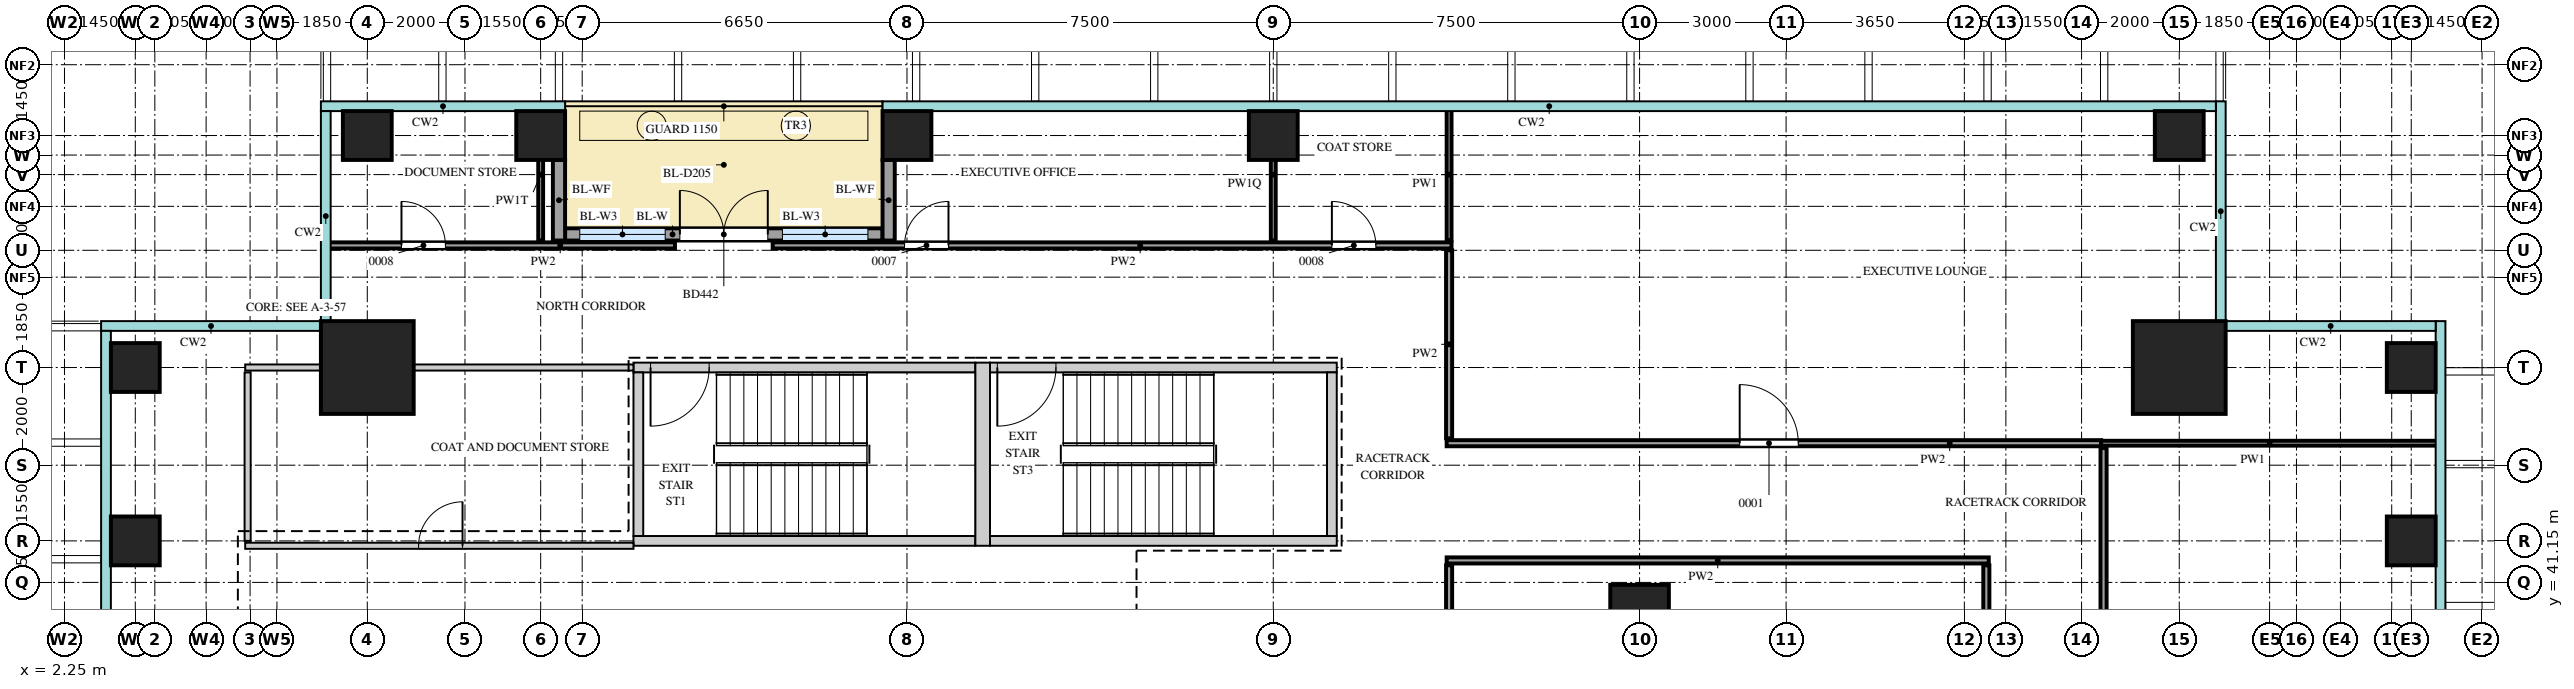
"""IFC4 building model, lengths in metres.
Left out: names, types, materials, properties, quantities, classifications, styles, units other than length and angle.
Written with IfcOpenShell. Run it as: python <this file> out.ifc"""

import sys

from ifc_helpers import new_model, si_unit, direction, frame, frame_2d, origin, origin_2d, place, context, subcontext, project, spatial, rectangle, extrude, source, transform, mapped, element, fill, save


model = new_model("IFC4")
c1 = context("Model", 3, precision=1e-05, world=origin(), true_north=direction((0.0, 1.0)))
c2 = subcontext(c1, "Body", "Model", "MODEL_VIEW")
j1 = project(units=[si_unit("LENGTHUNIT", "METRE"), si_unit("PLANEANGLEUNIT", "RADIAN")], contexts=[c1])
p1 = place(None, origin())
s1 = spatial("IfcSite", under=j1, at=p1, CompositionType="ELEMENT")
p2 = place(p1, origin())
s2 = spatial("IfcBuilding", under=s1, at=p2, CompositionType="ELEMENT")
p3 = place(p2, frame((0.0, 0.0, 200.7)))
s3 = spatial("IfcBuildingStorey", under=s2, at=p3, CompositionType="ELEMENT", Elevation=200.7)
m1 = source(origin(), c2, "Body", "SweptSolid", [
    extrude(rectangle(XDim=7.0, YDim=0.2, at=frame_2d((3.5, 0.0))), origin(), (0.0, 0.0, 1.0), 3.75),
])
p4 = place(p3, frame((13.9, 45.55, 0.0), z_axis=(0.0, 0.0, 1.0), x_axis=(1.0, 0.0, 0.0)))
e1 = element("IfcWall", 1, at=p4, inside=s3, PredefinedType="SHEAR", context=c2, shape_type="MappedRepresentation", body=[
    mapped(m1, transform((0.0, 0.0, 0.0))),
])
m2 = source(origin(), c2, "Body", "SweptSolid", [
    extrude(rectangle(XDim=1.2, YDim=2.1, at=frame_2d((0.6, 1.05))), frame((0.0, 0.11, 0.0), z_axis=(0.0, -1.0, 0.0), x_axis=(1.0, 0.0, 0.0)), (0.0, 0.0, 1.0), 0.22),
])
p5 = place(p4, frame((0.35, 0.0, 0.0)))
e2 = element("IfcOpeningElement", 2, at=p5, cuts=e1, PredefinedType="OPENING", context=c2, shape_type="MappedRepresentation", body=[
    mapped(m2, transform((0.0, 0.0, 0.0))),
])
p6 = place(p3, frame((13.9, 42.0, 0.0), z_axis=(0.0, 0.0, 1.0), x_axis=(1.0, 0.0, 0.0)))
e3 = element("IfcWall", 3, at=p6, inside=s3, PredefinedType="SHEAR", context=c2, shape_type="MappedRepresentation", body=[
    mapped(m1, transform((0.0, 0.0, 0.0))),
])
m3 = source(origin(), c2, "Body", "SweptSolid", [
    extrude(rectangle(XDim=7.1, YDim=0.2, at=frame_2d((3.55, 0.0))), origin(), (0.0, 0.0, 1.0), 3.75),
])
p7 = place(p3, frame((21.2, 45.55, 0.0), z_axis=(0.0, 0.0, 1.0), x_axis=(1.0, 0.0, 0.0)))
e4 = element("IfcWall", 4, at=p7, inside=s3, PredefinedType="SHEAR", context=c2, shape_type="MappedRepresentation", body=[
    mapped(m3, transform((0.0, 0.0, 0.0))),
])
p8 = place(p7, frame((0.15, 0.0, 0.0)))
e5 = element("IfcOpeningElement", 5, at=p8, cuts=e4, PredefinedType="OPENING", context=c2, shape_type="MappedRepresentation", body=[
    mapped(m2, transform((0.0, 0.0, 0.0))),
])
p9 = place(p3, frame((21.2, 42.0, 0.0), z_axis=(0.0, 0.0, 1.0), x_axis=(1.0, 0.0, 0.0)))
e6 = element("IfcWall", 6, at=p9, inside=s3, PredefinedType="SHEAR", context=c2, shape_type="MappedRepresentation", body=[
    mapped(m3, transform((0.0, 0.0, 0.0))),
])
m4 = source(origin(), c2, "Body", "SweptSolid", [
    extrude(rectangle(XDim=3.75, YDim=0.3, at=frame_2d((1.875, 0.0))), origin(), (0.0, 0.0, 1.0), 3.75),
])
p10 = place(p3, frame((21.05, 41.9, 0.0), z_axis=(0.0, 0.0, 1.0), x_axis=(0.0, 1.0, 0.0)))
e7 = element("IfcWall", 7, at=p10, inside=s3, PredefinedType="SHEAR", context=c2, shape_type="MappedRepresentation", body=[
    mapped(m4, transform((0.0, 0.0, 0.0))),
])
m5 = source(origin(), c2, "Body", "SweptSolid", [
    extrude(rectangle(XDim=3.35, YDim=0.2, at=frame_2d((1.675, 0.0))), origin(), (0.0, 0.0, 1.0), 3.75),
])
for number, where, z_axis, x_axis in (
    (8, (14.0, 42.1, 0.0), (0.0, 0.0, 1.0), (0.0, 1.0, 0.0)),
    (9, (28.2, 42.1, 0.0), (0.0, 0.0, 1.0), (0.0, 1.0, 0.0)),
):
    element("IfcWall", number, at=place(p3, frame(where, z_axis=z_axis, x_axis=x_axis)), inside=s3, PredefinedType="SHEAR", context=c2, shape_type="MappedRepresentation", body=[
        mapped(m5, transform((0.0, 0.0, 0.0))),
    ])
m6 = source(origin(), c2, "Body", "SweptSolid", [
    extrude(rectangle(XDim=1.9, YDim=1.9, at=origin_2d()), origin(), (0.0, 0.0, 1.0), 4.0),
])
for number, where, z_axis, x_axis in (
    (10, (45.55, 45.55, 0.0), (0.0, 0.0, 1.0), (1.0, 0.0, 0.0)),
    (11, (8.45, 45.55, 0.0), (0.0, 0.0, 1.0), (1.0, 0.0, 0.0)),
):
    element("IfcColumn", number, at=place(p3, frame(where, z_axis=z_axis, x_axis=x_axis)), inside=s3, PredefinedType="COLUMN", context=c2, shape_type="MappedRepresentation", body=[
        mapped(m6, transform((0.0, 0.0, 0.0))),
    ])
m7 = source(origin(), c2, "Body", "SweptSolid", [
    extrude(rectangle(XDim=1.0, YDim=1.0, at=origin_2d()), origin(), (0.0, 0.0, 1.0), 3.75),
])
for number, where, z_axis, x_axis in (
    (12, (50.3, 42.0, 0.0), (0.0, 0.0, 1.0), (1.0, 0.0, 0.0)),
    (13, (50.3, 45.55, 0.0), (0.0, 0.0, 1.0), (1.0, 0.0, 0.0)),
    (14, (8.45, 50.3, 0.0), (0.0, 0.0, 1.0), (1.0, 0.0, 0.0)),
    (15, (12.0, 50.3, 0.0), (0.0, 0.0, 1.0), (1.0, 0.0, 0.0)),
    (16, (19.5, 50.3, 0.0), (0.0, 0.0, 1.0), (1.0, 0.0, 0.0)),
    (17, (27.0, 50.3, 0.0), (0.0, 0.0, 1.0), (1.0, 0.0, 0.0)),
    (18, (45.55, 50.3, 0.0), (0.0, 0.0, 1.0), (1.0, 0.0, 0.0)),
    (19, (3.7, 42.0, 0.0), (0.0, 0.0, 1.0), (1.0, 0.0, 0.0)),
    (20, (3.7, 45.55, 0.0), (0.0, 0.0, 1.0), (1.0, 0.0, 0.0)),
):
    element("IfcColumn", number, at=place(p3, frame(where, z_axis=z_axis, x_axis=x_axis)), inside=s3, PredefinedType="COLUMN", context=c2, shape_type="MappedRepresentation", body=[
        mapped(m7, transform((0.0, 0.0, 0.0))),
    ])
m8 = source(origin(), c2, "Body", "SweptSolid", [
    extrude(rectangle(XDim=1.2, YDim=1.2, at=origin_2d()), origin(), (0.0, 0.0, 1.0), 3.75),
])
p11 = place(p3, frame((34.5, 40.5, 0.0), z_axis=(0.0, 0.0, 1.0), x_axis=(1.0, 0.0, 0.0)))
e21 = element("IfcColumn", 21, at=p11, inside=s3, PredefinedType="COLUMN", context=c2, shape_type="MappedRepresentation", body=[
    mapped(m8, transform((0.0, 0.0, 0.0))),
])
m9 = source(origin(), c2, "Body", "SweptSolid", [
    extrude(rectangle(XDim=6.5, YDim=0.25, at=frame_2d((3.25, 0.0))), origin(), (0.0, 0.0, 1.0), 3.75),
])
p12 = place(p3, frame((12.5, 48.275, 0.0), z_axis=(0.0, 0.0, 1.0), x_axis=(1.0, 0.0, 0.0)))
e22 = element("IfcWall", 22, at=p12, inside=s3, PredefinedType="SOLIDWALL", context=c2, shape_type="MappedRepresentation", body=[
    mapped(m9, transform((0.0, 0.0, 0.0))),
])
m10 = source(origin(), c2, "Body", "SweptSolid", [
    extrude(rectangle(XDim=1.75, YDim=2.4, at=frame_2d((0.875, 1.2))), frame((0.0, 0.135, 0.0), z_axis=(0.0, -1.0, 0.0), x_axis=(1.0, 0.0, 0.0)), (0.0, 0.0, 1.0), 0.27),
])
p13 = place(p12, frame((0.3, 0.0, 0.0)))
e23 = element("IfcOpeningElement", 23, at=p13, cuts=e22, PredefinedType="OPENING", context=c2, shape_type="MappedRepresentation", body=[
    mapped(m10, transform((0.0, 0.0, 0.0))),
])
p14 = place(p12, frame((4.45, 0.0, 0.0)))
e24 = element("IfcOpeningElement", 24, at=p14, cuts=e22, PredefinedType="OPENING", context=c2, shape_type="MappedRepresentation", body=[
    mapped(m10, transform((0.0, 0.0, 0.0))),
])
m11 = source(origin(), c2, "Body", "SweptSolid", [
    extrude(rectangle(XDim=1.8, YDim=2.4, at=frame_2d((0.9, 1.2))), frame((0.0, 0.135, 0.0), z_axis=(0.0, -1.0, 0.0), x_axis=(1.0, 0.0, 0.0)), (0.0, 0.0, 1.0), 0.27),
])
p15 = place(p12, frame((2.35, 0.0, 0.0)))
e25 = element("IfcOpeningElement", 25, at=p15, cuts=e22, PredefinedType="OPENING", context=c2, shape_type="MappedRepresentation", body=[
    mapped(m11, transform((0.0, 0.0, 0.0))),
])
m12 = source(origin(), c2, "Body", "SweptSolid", [
    extrude(rectangle(XDim=1.65, YDim=0.25, at=frame_2d((0.825, 0.0))), origin(), (0.0, 0.0, 1.0), 3.45),
])
for number, where, z_axis, x_axis in (
    (26, (12.375, 49.8, 0.0), (0.0, 0.0, 1.0), (0.0, -1.0, 0.0)),
    (27, (19.125, 49.8, 0.0), (0.0, 0.0, 1.0), (0.0, -1.0, 0.0)),
):
    element("IfcWall", number, at=place(p3, frame(where, z_axis=z_axis, x_axis=x_axis)), inside=s3, PredefinedType="SOLIDWALL", context=c2, shape_type="MappedRepresentation", body=[
        mapped(m12, transform((0.0, 0.0, 0.0))),
    ])
m13 = source(origin(), c2, "Body", "SweptSolid", [
    extrude(rectangle(XDim=33.8, YDim=0.125, at=frame_2d((16.9, 0.0))), origin(), (0.0, 0.0, 1.0), 3.8),
])
p16 = place(p3, frame((44.0, 10.1, 0.0), z_axis=(0.0, 0.0, 1.0), x_axis=(0.0, 1.0, 0.0)))
e28 = element("IfcWall", 28, at=p16, inside=s3, PredefinedType="PARTITIONING", context=c2, shape_type="MappedRepresentation", body=[
    mapped(m13, transform((0.0, 0.0, 0.0))),
])
m14 = source(origin(), c2, "Body", "SweptSolid", [
    extrude(rectangle(XDim=0.9, YDim=2.1, at=frame_2d((0.45, 1.05))), frame((0.0, 0.073, 0.0), z_axis=(0.0, -1.0, 0.0), x_axis=(1.0, 0.0, 0.0)), (0.0, 0.0, 1.0), 0.145),
])
p17 = place(p16, frame((9.0, 0.0, 0.0)))
e29 = element("IfcOpeningElement", 29, at=p17, cuts=e28, PredefinedType="OPENING", context=c2, shape_type="MappedRepresentation", body=[
    mapped(m14, transform((0.0, 0.0, 0.0))),
])
p18 = place(p16, frame((23.6, 0.0, 0.0)))
e30 = element("IfcOpeningElement", 30, at=p18, cuts=e28, PredefinedType="OPENING", context=c2, shape_type="MappedRepresentation", body=[
    mapped(m14, transform((0.0, 0.0, 0.0))),
])
m15 = source(origin(), c2, "Body", "SweptSolid", [
    extrude(rectangle(XDim=29.0, YDim=0.125, at=frame_2d((14.5, 0.0))), origin(), (0.0, 0.0, 1.0), 3.8),
])
p19 = place(p3, frame((41.6, 12.5, 0.0), z_axis=(0.0, 0.0, 1.0), x_axis=(0.0, 1.0, 0.0)))
e31 = element("IfcWall", 31, at=p19, inside=s3, PredefinedType="PARTITIONING", context=c2, shape_type="MappedRepresentation", body=[
    mapped(m15, transform((0.0, 0.0, 0.0))),
])
p20 = place(p19, frame((25.7, 0.0, 0.0)))
e32 = element("IfcOpeningElement", 32, at=p20, cuts=e31, PredefinedType="OPENING", context=c2, shape_type="MappedRepresentation", body=[
    mapped(m14, transform((0.0, 0.0, 0.0))),
])
m16 = source(origin(), c2, "Body", "SweptSolid", [
    extrude(rectangle(XDim=5.4, YDim=0.125, at=frame_2d((2.7, 0.0))), origin(), (0.0, 0.0, 1.0), 3.8),
])
p21 = place(p3, frame((30.6, 36.1, 0.0), z_axis=(0.0, 0.0, 1.0), x_axis=(0.0, 1.0, 0.0)))
e33 = element("IfcWall", 33, at=p21, inside=s3, PredefinedType="PARTITIONING", context=c2, shape_type="MappedRepresentation", body=[
    mapped(m16, transform((0.0, 0.0, 0.0))),
])
m17 = source(origin(), c2, "Body", "SweptSolid", [
    extrude(rectangle(XDim=11.1, YDim=0.125, at=frame_2d((5.55, 0.0))), origin(), (0.0, 0.0, 1.0), 3.8),
])
p22 = place(p3, frame((30.55, 41.6, 0.0), z_axis=(0.0, 0.0, 1.0), x_axis=(1.0, 0.0, 0.0)))
e34 = element("IfcWall", 34, at=p22, inside=s3, PredefinedType="PARTITIONING", context=c2, shape_type="MappedRepresentation", body=[
    mapped(m17, transform((0.0, 0.0, 0.0))),
])
m18 = source(origin(), c2, "Body", "SweptSolid", [
    extrude(rectangle(XDim=7.95, YDim=0.125, at=frame_2d((3.975, 0.0))), origin(), (0.0, 0.0, 1.0), 3.8),
])
p23 = place(p3, frame((5.95, 41.9, 0.0), z_axis=(0.0, 0.0, 1.0), x_axis=(1.0, 0.0, 0.0)))
e35 = element("IfcWall", 35, at=p23, inside=s3, PredefinedType="PARTITIONING", context=c2, shape_type="MappedRepresentation", body=[
    mapped(m18, transform((0.0, 0.0, 0.0))),
])
p24 = place(p23, frame((3.55, 0.0, 0.0)))
e36 = element("IfcOpeningElement", 36, at=p24, cuts=e35, PredefinedType="OPENING", context=c2, shape_type="MappedRepresentation", body=[
    mapped(m14, transform((0.0, 0.0, 0.0))),
])
m19 = source(origin(), c2, "Body", "SweptSolid", [
    extrude(rectangle(XDim=3.45, YDim=0.125, at=frame_2d((1.725, 0.0))), origin(), (0.0, 0.0, 1.0), 3.8),
])
p25 = place(p3, frame((6.0, 42.0, 0.0), z_axis=(0.0, 0.0, 1.0), x_axis=(0.0, 1.0, 0.0)))
e37 = element("IfcWall", 37, at=p25, inside=s3, PredefinedType="PARTITIONING", context=c2, shape_type="MappedRepresentation", body=[
    mapped(m19, transform((0.0, 0.0, 0.0))),
])
m20 = source(origin(), c2, "Body", "SweptSolid", [
    extrude(rectangle(XDim=13.4, YDim=0.125, at=frame_2d((6.7, 0.0))), origin(), (0.0, 0.0, 1.0), 3.8),
])
p26 = place(p3, frame((30.55, 44.0, 0.0), z_axis=(0.0, 0.0, 1.0), x_axis=(1.0, 0.0, 0.0)))
e38 = element("IfcWall", 38, at=p26, inside=s3, PredefinedType="PARTITIONING", context=c2, shape_type="MappedRepresentation", body=[
    mapped(m20, transform((0.0, 0.0, 0.0))),
])
m21 = source(origin(), c2, "Body", "SweptSolid", [
    extrude(rectangle(XDim=1.2, YDim=2.1, at=frame_2d((0.6, 1.05))), frame((0.0, 0.073, 0.0), z_axis=(0.0, -1.0, 0.0), x_axis=(1.0, 0.0, 0.0)), (0.0, 0.0, 1.0), 0.145),
])
p27 = place(p26, frame((6.0, 0.0, 0.0)))
e39 = element("IfcOpeningElement", 39, at=p27, cuts=e38, PredefinedType="OPENING", context=c2, shape_type="MappedRepresentation", body=[
    mapped(m21, transform((0.0, 0.0, 0.0))),
])
m22 = source(origin(), c2, "Body", "SweptSolid", [
    extrude(rectangle(XDim=6.9, YDim=0.1, at=frame_2d((3.45, 0.0))), origin(), (0.0, 0.0, 1.0), 3.8),
])
p28 = place(p3, frame((43.95, 44.0, 0.0), z_axis=(0.0, 0.0, 1.0), x_axis=(1.0, 0.0, 0.0)))
e40 = element("IfcWall", 40, at=p28, inside=s3, PredefinedType="PARTITIONING", context=c2, shape_type="MappedRepresentation", body=[
    mapped(m22, transform((0.0, 0.0, 0.0))),
])
m23 = source(origin(), c2, "Body", "SweptSolid", [
    extrude(rectangle(XDim=3.85, YDim=0.125, at=frame_2d((1.925, 0.0))), origin(), (0.0, 0.0, 1.0), 3.8),
])
p29 = place(p3, frame((30.6, 44.1, 0.0), z_axis=(0.0, 0.0, 1.0), x_axis=(0.0, 1.0, 0.0)))
e41 = element("IfcWall", 41, at=p29, inside=s3, PredefinedType="PARTITIONING", context=c2, shape_type="MappedRepresentation", body=[
    mapped(m23, transform((0.0, 0.0, 0.0))),
])
m24 = source(origin(), c2, "Body", "SweptSolid", [
    extrude(rectangle(XDim=7.95, YDim=0.125, at=frame_2d((3.975, 0.0))), origin(), (0.0, 0.0, 1.0), 3.25),
])
p30 = place(p3, frame((5.95, 45.55, 0.0), z_axis=(0.0, 0.0, 1.0), x_axis=(1.0, 0.0, 0.0)))
e42 = element("IfcWall", 42, at=p30, inside=s3, PredefinedType="PARTITIONING", context=c2, shape_type="MappedRepresentation", body=[
    mapped(m24, transform((0.0, 0.0, 0.0))),
])
m25 = source(origin(), c2, "Body", "SweptSolid", [
    extrude(rectangle(XDim=2.7, YDim=0.1, at=frame_2d((1.35, 0.0))), origin(), (0.0, 0.0, 1.0), 3.3),
])
p31 = place(p3, frame((12.0, 48.15, 0.0), z_axis=(0.0, 0.0, 1.0), x_axis=(0.0, 1.0, 0.0)))
e43 = element("IfcWall", 43, at=p31, inside=s3, PredefinedType="PARTITIONING", context=c2, shape_type="MappedRepresentation", body=[
    mapped(m25, transform((0.0, 0.0, 0.0))),
])
m26 = source(origin(), c2, "Body", "SweptSolid", [
    extrude(rectangle(XDim=2.7, YDim=0.1, at=frame_2d((1.35, 0.0))), origin(), (0.0, 0.0, 1.0), 3.42),
])
p32 = place(p3, frame((27.0, 48.15, 0.0), z_axis=(0.0, 0.0, 1.0), x_axis=(0.0, 1.0, 0.0)))
e44 = element("IfcWall", 44, at=p32, inside=s3, PredefinedType="PARTITIONING", context=c2, shape_type="MappedRepresentation", body=[
    mapped(m26, transform((0.0, 0.0, 0.0))),
])
m27 = source(origin(), c2, "Body", "SweptSolid", [
    extrude(rectangle(XDim=2.7, YDim=0.1, at=frame_2d((1.35, 0.0))), origin(), (0.0, 0.0, 1.0), 3.8),
])
p33 = place(p3, frame((30.6, 48.15, 0.0), z_axis=(0.0, 0.0, 1.0), x_axis=(0.0, 1.0, 0.0)))
e45 = element("IfcWall", 45, at=p33, inside=s3, PredefinedType="PARTITIONING", context=c2, shape_type="MappedRepresentation", body=[
    mapped(m27, transform((0.0, 0.0, 0.0))),
])
m28 = source(origin(), c2, "Body", "SweptSolid", [
    extrude(rectangle(XDim=7.1, YDim=0.125, at=frame_2d((3.55, 0.0))), origin(), (0.0, 0.0, 1.0), 3.8),
])
p34 = place(p3, frame((7.65, 48.05, 0.0), z_axis=(0.0, 0.0, 1.0), x_axis=(1.0, 0.0, 0.0)))
e46 = element("IfcWall", 46, at=p34, inside=s3, PredefinedType="PARTITIONING", context=c2, shape_type="MappedRepresentation", body=[
    mapped(m28, transform((0.0, 0.0, 0.0))),
])
p35 = place(p34, frame((1.5, 0.0, 0.0)))
e47 = element("IfcOpeningElement", 47, at=p35, cuts=e46, PredefinedType="OPENING", context=c2, shape_type="MappedRepresentation", body=[
    mapped(m14, transform((0.0, 0.0, 0.0))),
])
m29 = source(origin(), c2, "Body", "SweptSolid", [
    extrude(rectangle(XDim=13.9, YDim=0.125, at=frame_2d((6.95, 0.0))), origin(), (0.0, 0.0, 1.0), 3.8),
])
p36 = place(p3, frame((16.75, 48.05, 0.0), z_axis=(0.0, 0.0, 1.0), x_axis=(1.0, 0.0, 0.0)))
e48 = element("IfcWall", 48, at=p36, inside=s3, PredefinedType="PARTITIONING", context=c2, shape_type="MappedRepresentation", body=[
    mapped(m29, transform((0.0, 0.0, 0.0))),
])
p37 = place(p36, frame((2.7, 0.0, 0.0)))
e49 = element("IfcOpeningElement", 49, at=p37, cuts=e48, PredefinedType="OPENING", context=c2, shape_type="MappedRepresentation", body=[
    mapped(m14, transform((0.0, 0.0, 0.0))),
])
p38 = place(p36, frame((11.45, 0.0, 0.0)))
e50 = element("IfcOpeningElement", 50, at=p38, cuts=e48, PredefinedType="OPENING", context=c2, shape_type="MappedRepresentation", body=[
    mapped(m14, transform((0.0, 0.0, 0.0))),
])
m30 = source(origin(), c2, "Body", "SweptSolid", [
    extrude(rectangle(XDim=1.75, YDim=2.4, at=frame_2d((0.875, 1.2))), frame((0.0, 0.03, 0.0), z_axis=(0.0, -1.0, 0.0), x_axis=(1.0, 0.0, 0.0)), (0.0, 0.0, 1.0), 0.06),
])
p39 = place(p13, origin())
e51 = element("IfcWindow", 51, at=p39, inside=s3, PartitioningType="SINGLE_PANEL", PredefinedType="WINDOW", context=c2, shape_type="MappedRepresentation", body=[
    mapped(m30, transform((0.0, 0.0, 0.0))),
])
fill(e23, e51)
p40 = place(p14, origin())
e52 = element("IfcWindow", 52, at=p40, inside=s3, PartitioningType="SINGLE_PANEL", PredefinedType="WINDOW", context=c2, shape_type="MappedRepresentation", body=[
    mapped(m30, transform((0.0, 0.0, 0.0))),
])
fill(e24, e52)
m31 = source(origin(), c2, "Body", "SweptSolid", [
    extrude(rectangle(XDim=1.8, YDim=2.4, at=frame_2d((0.9, 1.2))), frame((0.0, 0.025, 0.0), z_axis=(0.0, -1.0, 0.0), x_axis=(1.0, 0.0, 0.0)), (0.0, 0.0, 1.0), 0.05),
])
p41 = place(p15, origin())
e53 = element("IfcDoor", 53, at=p41, inside=s3, OperationType="DOUBLE_DOOR_DOUBLE_SWING", PredefinedType="DOOR", context=c2, shape_type="MappedRepresentation", body=[
    mapped(m31, transform((0.0, 0.0, 0.0))),
])
fill(e25, e53)
m32 = source(origin(), c2, "Body", "SweptSolid", [
    extrude(rectangle(XDim=1.2, YDim=2.1, at=frame_2d((0.6, 1.05))), frame((0.0, 0.025, 0.0), z_axis=(0.0, -1.0, 0.0), x_axis=(1.0, 0.0, 0.0)), (0.0, 0.0, 1.0), 0.05),
])
p42 = place(p27, origin())
e54 = element("IfcDoor", 54, at=p42, inside=s3, OperationType="SINGLE_SWING_RIGHT", PredefinedType="DOOR", context=c2, shape_type="MappedRepresentation", body=[
    mapped(m32, transform((0.0, 0.0, 0.0))),
])
fill(e39, e54)
m33 = source(origin(), c2, "Body", "SweptSolid", [
    extrude(rectangle(XDim=0.9, YDim=2.1, at=frame_2d((0.45, 1.05))), frame((0.0, 0.025, 0.0), z_axis=(0.0, -1.0, 0.0), x_axis=(1.0, 0.0, 0.0)), (0.0, 0.0, 1.0), 0.05),
])
p43 = place(p24, origin())
e55 = element("IfcDoor", 55, at=p43, inside=s3, OperationType="SINGLE_SWING_LEFT", PredefinedType="DOOR", context=c2, shape_type="MappedRepresentation", body=[
    mapped(m33, transform((0.0, 0.0, 0.0))),
])
fill(e36, e55)
p44 = place(p35, origin())
e56 = element("IfcDoor", 56, at=p44, inside=s3, OperationType="SINGLE_SWING_RIGHT", PredefinedType="DOOR", context=c2, shape_type="MappedRepresentation", body=[
    mapped(m33, transform((0.0, 0.0, 0.0))),
])
fill(e47, e56)
p45 = place(p37, origin())
e57 = element("IfcDoor", 57, at=p45, inside=s3, OperationType="SINGLE_SWING_LEFT", PredefinedType="DOOR", context=c2, shape_type="MappedRepresentation", body=[
    mapped(m33, transform((0.0, 0.0, 0.0))),
])
fill(e49, e57)
p46 = place(p38, origin())
e58 = element("IfcDoor", 58, at=p46, inside=s3, OperationType="SINGLE_SWING_RIGHT", PredefinedType="DOOR", context=c2, shape_type="MappedRepresentation", body=[
    mapped(m33, transform((0.0, 0.0, 0.0))),
])
fill(e50, e58)
p47 = place(p5, origin())
e59 = element("IfcDoor", 59, at=p47, inside=s3, OperationType="SINGLE_SWING_LEFT", PredefinedType="DOOR", context=c2, shape_type="MappedRepresentation", body=[
    mapped(m32, transform((0.0, 0.0, 0.0))),
])
fill(e2, e59)
p48 = place(p8, origin())
e60 = element("IfcDoor", 60, at=p48, inside=s3, OperationType="SINGLE_SWING_LEFT", PredefinedType="DOOR", context=c2, shape_type="MappedRepresentation", body=[
    mapped(m32, transform((0.0, 0.0, 0.0))),
])
fill(e5, e60)
save(model, sys.argv[1])
